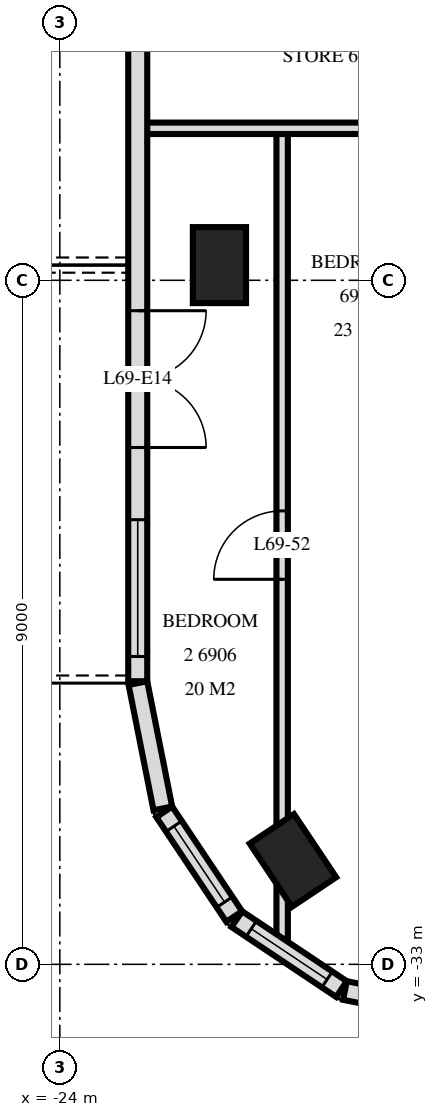
"""IFC4 building model, lengths in metres.
Left out: names, types, materials, properties, quantities, classifications, styles, units other than length and angle.
Written with IfcOpenShell. Run it as: python <this file> out.ifc"""

import sys

from ifc_helpers import new_model, si_unit, direction, frame, frame_2d, origin, origin_2d, place, context, subcontext, project, spatial, rectangle, extrude, element, fill, save


model = new_model("IFC4")
c1 = context("Model", 3, precision=1e-05, world=origin(), true_north=direction((0.0, 1.0)))
c2 = subcontext(c1, "Body", "Model", "MODEL_VIEW")
j1 = project(units=[si_unit("LENGTHUNIT", "METRE"), si_unit("PLANEANGLEUNIT", "RADIAN")], contexts=[c1])
p1 = place(None, origin())
s1 = spatial("IfcSite", under=j1, at=p1, CompositionType="ELEMENT")
p2 = place(p1, origin())
s2 = spatial("IfcBuilding", under=s1, at=p2, CompositionType="ELEMENT")
p3 = place(p2, frame((0.0, 0.0, 263.1)))
s3 = spatial("IfcBuildingStorey", under=s2, at=p3, CompositionType="ELEMENT", Elevation=263.1)
for number, where, z_axis, x_axis in (
    (1, (-21.9, -23.8, 0.0), (0.0, 0.0, 1.0), (0.0, 1.0, 0.0)),
    (2, (-20.933, -31.633, 0.0), (0.0, 0.0, 1.0), (-0.556, 0.831, 0.0)),
):
    element("IfcColumn", number, at=place(p3, frame(where, z_axis=z_axis, x_axis=x_axis)), inside=s3, PredefinedType="COLUMN", context=c2, shape_type="SweptSolid", body=[
        extrude(rectangle(XDim=1.0, YDim=0.7, at=origin_2d()), origin(), (0.0, 0.0, 1.0), 3.5),
    ])
p4 = place(p3, frame((-22.975, -3.325, 0.0), z_axis=(0.0, 0.0, 1.0), x_axis=(0.0, -1.0, 0.0)))
e3 = element("IfcWall", 3, at=p4, inside=s3, PredefinedType="SOLIDWALL", context=c2, shape_type="SweptSolid", body=[
    extrude(rectangle(XDim=25.951, YDim=0.25, at=frame_2d((12.975, 0.0))), origin(), (0.0, 0.0, 1.0), 3.22),
])
p5 = place(p4, frame((1.925, 0.0, 0.0)))
e4 = element("IfcOpeningElement", 4, at=p5, cuts=e3, PredefinedType="OPENING", context=c2, shape_type="SweptSolid", body=[
    extrude(rectangle(XDim=1.8, YDim=2.4, at=frame_2d((0.9, 1.2))), frame((0.0, 0.135, 0.0), z_axis=(0.0, -1.0, 0.0), x_axis=(1.0, 0.0, 0.0)), (0.0, 0.0, 1.0), 0.27),
])
p6 = place(p4, frame((7.975, 0.0, 0.0)))
e5 = element("IfcOpeningElement", 5, at=p6, cuts=e3, PredefinedType="OPENING", context=c2, shape_type="SweptSolid", body=[
    extrude(rectangle(XDim=1.8, YDim=2.4, at=frame_2d((0.9, 1.2))), frame((0.0, 0.135, 0.0), z_axis=(0.0, -1.0, 0.0), x_axis=(1.0, 0.0, 0.0)), (0.0, 0.0, 1.0), 0.27),
])
p7 = place(p4, frame((12.575, 0.0, 0.9)))
e6 = element("IfcOpeningElement", 6, at=p7, cuts=e3, PredefinedType="OPENING", context=c2, shape_type="SweptSolid", body=[
    extrude(rectangle(XDim=1.2, YDim=1.5, at=frame_2d((0.6, 0.75))), frame((0.0, 0.135, 0.0), z_axis=(0.0, -1.0, 0.0), x_axis=(1.0, 0.0, 0.0)), (0.0, 0.0, 1.0), 0.27),
])
p8 = place(p4, frame((15.775, 0.0, 0.0)))
e7 = element("IfcOpeningElement", 7, at=p8, cuts=e3, PredefinedType="OPENING", context=c2, shape_type="SweptSolid", body=[
    extrude(rectangle(XDim=1.8, YDim=2.4, at=frame_2d((0.9, 1.2))), frame((0.0, 0.135, 0.0), z_axis=(0.0, -1.0, 0.0), x_axis=(1.0, 0.0, 0.0)), (0.0, 0.0, 1.0), 0.27),
])
p9 = place(p4, frame((21.075, 0.0, 0.0)))
e8 = element("IfcOpeningElement", 8, at=p9, cuts=e3, PredefinedType="OPENING", context=c2, shape_type="SweptSolid", body=[
    extrude(rectangle(XDim=1.8, YDim=2.4, at=frame_2d((0.9, 1.2))), frame((0.0, 0.135, 0.0), z_axis=(0.0, -1.0, 0.0), x_axis=(1.0, 0.0, 0.0)), (0.0, 0.0, 1.0), 0.27),
])
p10 = place(p4, frame((23.825, 0.0, 0.9)))
e9 = element("IfcOpeningElement", 9, at=p10, cuts=e3, PredefinedType="OPENING", context=c2, shape_type="SweptSolid", body=[
    extrude(rectangle(XDim=1.8, YDim=1.5, at=frame_2d((0.9, 0.75))), frame((0.0, 0.135, 0.0), z_axis=(0.0, -1.0, 0.0), x_axis=(1.0, 0.0, 0.0)), (0.0, 0.0, 1.0), 0.27),
])
p11 = place(p3, frame((-22.973, -29.3, 0.0), z_axis=(0.0, 0.0, 1.0), x_axis=(0.19513878023, -0.980775640221, 0.0)))
e10 = element("IfcWall", 10, at=p11, inside=s3, PredefinedType="SOLIDWALL", context=c2, shape_type="SweptSolid", body=[
    extrude(rectangle(XDim=1.681, YDim=0.25, at=frame_2d((0.841, 0.0))), origin(), (0.0, 0.0, 1.0), 3.22),
])
p12 = place(p3, frame((-22.626, -30.994, 0.0), z_axis=(0.0, 0.0, 1.0), x_axis=(0.55555029066, -0.831482937015, 0.0)))
e11 = element("IfcWall", 11, at=p12, inside=s3, PredefinedType="SOLIDWALL", context=c2, shape_type="SweptSolid", body=[
    extrude(rectangle(XDim=1.656, YDim=0.25, at=frame_2d((0.828, 0.0))), origin(), (0.0, 0.0, 1.0), 3.22),
])
p13 = place(p12, frame((0.228, 0.0, 0.9)))
e12 = element("IfcOpeningElement", 12, at=p13, cuts=e11, PredefinedType="OPENING", context=c2, shape_type="SweptSolid", body=[
    extrude(rectangle(XDim=1.2, YDim=1.5, at=frame_2d((0.6, 0.75))), frame((0.0, 0.135, 0.0), z_axis=(0.0, -1.0, 0.0), x_axis=(1.0, 0.0, 0.0)), (0.0, 0.0, 1.0), 0.27),
])
p14 = place(p3, frame((-21.671, -32.406, 0.0), z_axis=(0.0, 0.0, 1.0), x_axis=(0.831482937015, -0.55555029066, 0.0)))
e13 = element("IfcWall", 13, at=p14, inside=s3, PredefinedType="SOLIDWALL", context=c2, shape_type="SweptSolid", body=[
    extrude(rectangle(XDim=1.656, YDim=0.25, at=frame_2d((0.828, 0.0))), origin(), (0.0, 0.0, 1.0), 3.22),
])
p15 = place(p14, frame((0.228, 0.0, 0.9)))
e14 = element("IfcOpeningElement", 14, at=p15, cuts=e13, PredefinedType="OPENING", context=c2, shape_type="SweptSolid", body=[
    extrude(rectangle(XDim=1.2, YDim=1.5, at=frame_2d((0.6, 0.75))), frame((0.0, 0.135, 0.0), z_axis=(0.0, -1.0, 0.0), x_axis=(1.0, 0.0, 0.0)), (0.0, 0.0, 1.0), 0.27),
])
p16 = place(p3, frame((-20.249, -33.344, 0.0), z_axis=(0.0, 0.0, 1.0), x_axis=(0.980770110232, -0.195166572128, 0.0)))
e15 = element("IfcWall", 15, at=p16, inside=s3, PredefinedType="SOLIDWALL", context=c2, shape_type="SweptSolid", body=[
    extrude(rectangle(XDim=1.681, YDim=0.25, at=frame_2d((0.841, 0.0))), origin(), (0.0, 0.0, 1.0), 3.22),
])
p17 = place(p3, frame((-21.075, -32.666, 0.0), z_axis=(0.0, 0.0, 1.0), x_axis=(0.0, 1.0, 0.0)))
e16 = element("IfcWall", 16, at=p17, inside=s3, PredefinedType="PARTITIONING", context=c2, shape_type="SweptSolid", body=[
    extrude(rectangle(XDim=10.666, YDim=0.15, at=frame_2d((5.333, 0.0))), origin(), (0.0, 0.0, 1.0), 3.22),
])
p18 = place(p17, frame((4.732, 0.0, 0.0)))
e17 = element("IfcOpeningElement", 17, at=p18, cuts=e16, PredefinedType="OPENING", context=c2, shape_type="SweptSolid", body=[
    extrude(rectangle(XDim=0.9, YDim=2.1, at=frame_2d((0.45, 1.05))), frame((0.0, 0.085, 0.0), z_axis=(0.0, -1.0, 0.0), x_axis=(1.0, 0.0, 0.0)), (0.0, 0.0, 1.0), 0.17),
])
p19 = place(p3, frame((-22.92, -22.0, 0.0), z_axis=(0.0, 0.0, 1.0), x_axis=(1.0, 0.0, 0.0)))
e18 = element("IfcWall", 18, at=p19, inside=s3, PredefinedType="PARTITIONING", context=c2, shape_type="SweptSolid", body=[
    extrude(rectangle(XDim=5.92, YDim=0.15, at=frame_2d((2.96, 0.0))), origin(), (0.0, 0.0, 1.0), 3.22),
])
p20 = place(p13, origin())
e19 = element("IfcWindow", 19, at=p20, inside=s3, PartitioningType="SINGLE_PANEL", PredefinedType="WINDOW", context=c2, shape_type="SweptSolid", body=[
    extrude(rectangle(XDim=1.2, YDim=1.5, at=frame_2d((0.6, 0.75))), frame((0.0, 0.03, 0.0), z_axis=(0.0, -1.0, 0.0), x_axis=(1.0, 0.0, 0.0)), (0.0, 0.0, 1.0), 0.06),
])
fill(e12, e19)
p21 = place(p15, origin())
e20 = element("IfcWindow", 20, at=p21, inside=s3, PartitioningType="SINGLE_PANEL", PredefinedType="WINDOW", context=c2, shape_type="SweptSolid", body=[
    extrude(rectangle(XDim=1.2, YDim=1.5, at=frame_2d((0.6, 0.75))), frame((0.0, 0.03, 0.0), z_axis=(0.0, -1.0, 0.0), x_axis=(1.0, 0.0, 0.0)), (0.0, 0.0, 1.0), 0.06),
])
fill(e14, e20)
p22 = place(p9, origin())
e21 = element("IfcDoor", 21, at=p22, inside=s3, OperationType="DOUBLE_DOOR_SINGLE_SWING", PredefinedType="DOOR", context=c2, shape_type="SweptSolid", body=[
    extrude(rectangle(XDim=1.8, YDim=2.4, at=frame_2d((0.9, 1.2))), frame((0.0, 0.025, 0.0), z_axis=(0.0, -1.0, 0.0), x_axis=(1.0, 0.0, 0.0)), (0.0, 0.0, 1.0), 0.05),
])
fill(e8, e21)
p23 = place(p10, origin())
e22 = element("IfcWindow", 22, at=p23, inside=s3, PartitioningType="SINGLE_PANEL", PredefinedType="WINDOW", context=c2, shape_type="SweptSolid", body=[
    extrude(rectangle(XDim=1.8, YDim=1.5, at=frame_2d((0.9, 0.75))), frame((0.0, 0.03, 0.0), z_axis=(0.0, -1.0, 0.0), x_axis=(1.0, 0.0, 0.0)), (0.0, 0.0, 1.0), 0.06),
])
fill(e9, e22)
p24 = place(p18, origin())
e23 = element("IfcDoor", 23, at=p24, inside=s3, OperationType="SINGLE_SWING_RIGHT", PredefinedType="DOOR", context=c2, shape_type="SweptSolid", body=[
    extrude(rectangle(XDim=0.9, YDim=2.1, at=frame_2d((0.45, 1.05))), frame((0.0, 0.025, 0.0), z_axis=(0.0, -1.0, 0.0), x_axis=(1.0, 0.0, 0.0)), (0.0, 0.0, 1.0), 0.05),
])
fill(e17, e23)
save(model, sys.argv[1])
